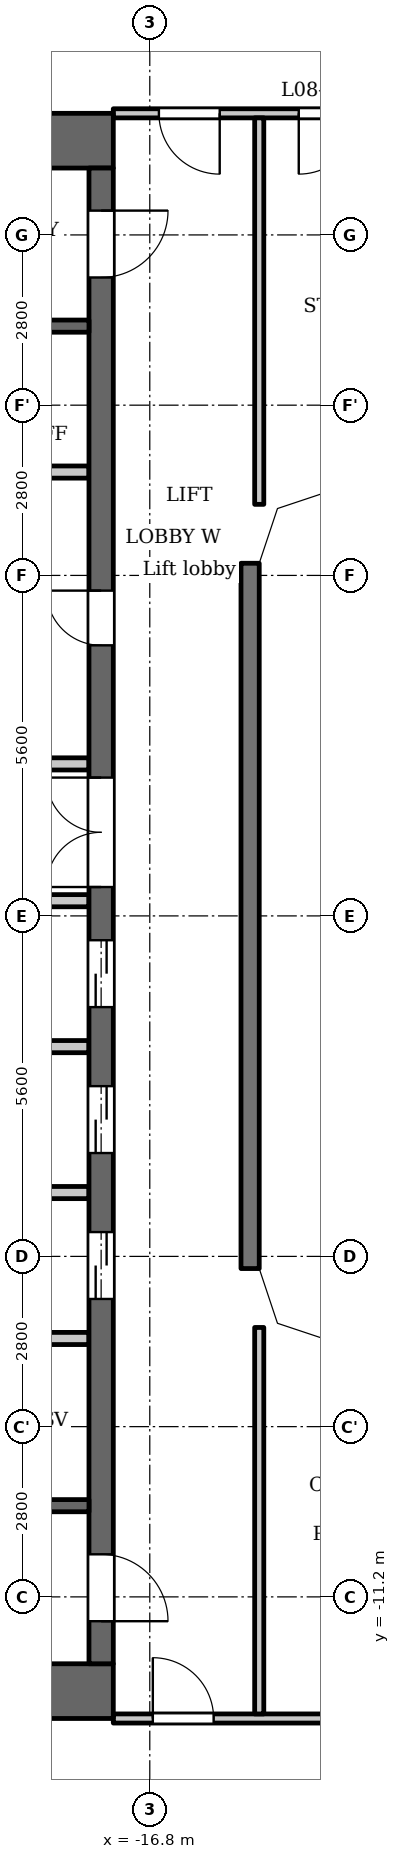
"""IFC4 building model, lengths in metres.
Left out: names, types, materials, properties, quantities, classifications, styles, units other than length and angle.
Written with IfcOpenShell. Run it as: python <this file> out.ifc"""

import sys

from ifc_helpers import new_model, si_unit, direction, frame, frame_2d, origin, place, context, subcontext, project, spatial, polyline, rectangle, outline, extrude, element, fill, save


model = new_model("IFC4")
c1 = context("Model", 3, precision=1e-05, world=origin(), true_north=direction((0.0, 1.0)))
c2 = subcontext(c1, "Body", "Model", "MODEL_VIEW")
j1 = project(units=[si_unit("LENGTHUNIT", "METRE"), si_unit("PLANEANGLEUNIT", "RADIAN")], contexts=[c1])
p1 = place(None, origin())
s1 = spatial("IfcSite", under=j1, at=p1, CompositionType="ELEMENT")
p2 = place(p1, origin())
s2 = spatial("IfcBuilding", under=s1, at=p2, CompositionType="ELEMENT")
p3 = place(p2, frame((0.0, 0.0, 37.5)))
s3 = spatial("IfcBuildingStorey", under=s2, at=p3, CompositionType="ELEMENT", Elevation=37.5)
p4 = place(p3, frame((-15.15, -5.8, 0.0), z_axis=(0.0, 0.0, 1.0), x_axis=(0.0, 1.0, 0.0)))
e1 = element("IfcWall", 1, at=p4, inside=s3, PredefinedType="SOLIDWALL", context=c2, shape_type="SweptSolid", body=[
    extrude(rectangle(XDim=11.6, YDim=0.3, at=frame_2d((5.8, 0.0))), origin(), (0.0, 0.0, 1.0), 3.2),
])
for number, where, z_axis, x_axis in (
    (2, (-17.4, 12.75, 0.0), (0.0, 0.0, 1.0), (-1.0, 0.0, 0.0)),
    (3, (-17.4, -12.75, 0.0), (0.0, 0.0, 1.0), (-1.0, 0.0, 0.0)),
):
    element("IfcWall", number, at=place(p3, frame(where, z_axis=z_axis, x_axis=x_axis)), inside=s3, PredefinedType="SHEAR", context=c2, shape_type="SweptSolid", body=[
        extrude(rectangle(XDim=10.4, YDim=0.9, at=frame_2d((5.2, 0.0))), origin(), (0.0, 0.0, 1.0), 3.2),
    ])
p5 = place(p3, frame((-17.6, -12.3, 0.0), z_axis=(0.0, 0.0, 1.0), x_axis=(0.0, 1.0, 0.0)))
e4 = element("IfcWall", 4, at=p5, inside=s3, PredefinedType="SHEAR", context=c2, shape_type="SweptSolid", body=[
    extrude(rectangle(XDim=24.6, YDim=0.4, at=frame_2d((12.3, 0.0))), origin(), (0.0, 0.0, 1.0), 3.2),
])
p6 = place(p5, frame((6.0, 0.0, 0.0)))
e5 = element("IfcOpeningElement", 5, at=p6, cuts=e4, PredefinedType="OPENING", context=c2, shape_type="SweptSolid", body=[
    extrude(rectangle(XDim=1.1, YDim=2.1, at=frame_2d((0.55, 1.05))), frame((0.0, 0.21, 0.0), z_axis=(0.0, -1.0, 0.0), x_axis=(1.0, 0.0, 0.0)), (0.0, 0.0, 1.0), 0.42),
])
p7 = place(p5, frame((8.4, 0.0, 0.0)))
e6 = element("IfcOpeningElement", 6, at=p7, cuts=e4, PredefinedType="OPENING", context=c2, shape_type="SweptSolid", body=[
    extrude(rectangle(XDim=1.1, YDim=2.1, at=frame_2d((0.55, 1.05))), frame((0.0, 0.21, 0.0), z_axis=(0.0, -1.0, 0.0), x_axis=(1.0, 0.0, 0.0)), (0.0, 0.0, 1.0), 0.42),
])
p8 = place(p5, frame((10.8, 0.0, 0.0)))
e7 = element("IfcOpeningElement", 7, at=p8, cuts=e4, PredefinedType="OPENING", context=c2, shape_type="SweptSolid", body=[
    extrude(rectangle(XDim=1.1, YDim=2.1, at=frame_2d((0.55, 1.05))), frame((0.0, 0.21, 0.0), z_axis=(0.0, -1.0, 0.0), x_axis=(1.0, 0.0, 0.0)), (0.0, 0.0, 1.0), 0.42),
])
p9 = place(p5, frame((16.75, 0.0, 0.0)))
e8 = element("IfcOpeningElement", 8, at=p9, cuts=e4, PredefinedType="OPENING", context=c2, shape_type="SweptSolid", body=[
    extrude(rectangle(XDim=0.9, YDim=2.1, at=frame_2d((0.45, 1.05))), frame((0.0, 0.21, 0.0), z_axis=(0.0, -1.0, 0.0), x_axis=(1.0, 0.0, 0.0)), (0.0, 0.0, 1.0), 0.42),
])
p10 = place(p5, frame((22.8, 0.0, 0.0)))
e9 = element("IfcOpeningElement", 9, at=p10, cuts=e4, PredefinedType="OPENING", context=c2, shape_type="SweptSolid", body=[
    extrude(rectangle(XDim=1.1, YDim=2.1, at=frame_2d((0.55, 1.05))), frame((0.0, 0.21, 0.0), z_axis=(0.0, -1.0, 0.0), x_axis=(1.0, 0.0, 0.0)), (0.0, 0.0, 1.0), 0.42),
])
p11 = place(p5, frame((0.7, 0.0, 0.0)))
e10 = element("IfcOpeningElement", 10, at=p11, cuts=e4, PredefinedType="OPENING", context=c2, shape_type="SweptSolid", body=[
    extrude(rectangle(XDim=1.1, YDim=2.1, at=frame_2d((0.55, 1.05))), frame((0.0, 0.21, 0.0), z_axis=(0.0, -1.0, 0.0), x_axis=(1.0, 0.0, 0.0)), (0.0, 0.0, 1.0), 0.42),
])
p12 = place(p5, frame((12.775, 0.0, 0.0)))
e11 = element("IfcOpeningElement", 11, at=p12, cuts=e4, PredefinedType="OPENING", context=c2, shape_type="SweptSolid", body=[
    extrude(rectangle(XDim=1.8, YDim=2.1, at=frame_2d((0.9, 1.05))), frame((0.0, 0.21, 0.0), z_axis=(0.0, -1.0, 0.0), x_axis=(1.0, 0.0, 0.0)), (0.0, 0.0, 1.0), 0.42),
])
p13 = place(p3, frame((-17.8, -9.7, 0.0), z_axis=(0.0, 0.0, 1.0), x_axis=(-1.0, 0.0, 0.0)))
e12 = element("IfcWall", 12, at=p13, inside=s3, PredefinedType="SHEAR", context=c2, shape_type="SweptSolid", body=[
    extrude(rectangle(XDim=8.3, YDim=0.2, at=frame_2d((4.15, 0.0))), origin(), (0.0, 0.0, 1.0), 3.2),
])
p14 = place(p13, frame((0.85, 0.0, 0.0)))
e13 = element("IfcOpeningElement", 13, at=p14, cuts=e12, PredefinedType="OPENING", context=c2, shape_type="SweptSolid", body=[
    extrude(rectangle(XDim=1.1, YDim=2.1, at=frame_2d((0.55, 1.05))), frame((0.0, 0.11, 0.0), z_axis=(0.0, -1.0, 0.0), x_axis=(1.0, 0.0, 0.0)), (0.0, 0.0, 1.0), 0.22),
])
p15 = place(p13, frame((3.75, 0.0, 0.0)))
e14 = element("IfcOpeningElement", 14, at=p15, cuts=e12, PredefinedType="OPENING", context=c2, shape_type="SweptSolid", body=[
    extrude(rectangle(XDim=1.1, YDim=2.1, at=frame_2d((0.55, 1.05))), frame((0.0, 0.11, 0.0), z_axis=(0.0, -1.0, 0.0), x_axis=(1.0, 0.0, 0.0)), (0.0, 0.0, 1.0), 0.22),
])
for number, where, z_axis, x_axis in (
    (15, (-17.8, -6.95, 0.0), (0.0, 0.0, 1.0), (-1.0, 0.0, 0.0)),
    (16, (-17.8, -4.55, 0.0), (0.0, 0.0, 1.0), (-1.0, 0.0, 0.0)),
    (17, (-17.8, -2.15, 0.0), (0.0, 0.0, 1.0), (-1.0, 0.0, 0.0)),
):
    element("IfcWall", number, at=place(p3, frame(where, z_axis=z_axis, x_axis=x_axis)), inside=s3, PredefinedType="PARTITIONING", context=c2, shape_type="SweptSolid", body=[
        extrude(rectangle(XDim=2.8, YDim=0.2, at=frame_2d((1.4, 0.0))), origin(), (0.0, 0.0, 1.0), 3.2),
    ])
for number, where, z_axis, x_axis in (
    (18, (-17.8, 0.25, 0.0), (0.0, 0.0, 1.0), (-1.0, 0.0, 0.0)),
    (19, (-17.8, 2.5, 0.0), (0.0, 0.0, 1.0), (-1.0, 0.0, 0.0)),
):
    element("IfcWall", number, at=place(p3, frame(where, z_axis=z_axis, x_axis=x_axis)), inside=s3, PredefinedType="PARTITIONING", context=c2, shape_type="SweptSolid", body=[
        extrude(rectangle(XDim=3.0, YDim=0.2, at=frame_2d((1.5, 0.0))), origin(), (0.0, 0.0, 1.0), 3.2),
    ])
p16 = place(p3, frame((-17.8, 7.3, 0.0), z_axis=(0.0, 0.0, 1.0), x_axis=(-1.0, 0.0, 0.0)))
e20 = element("IfcWall", 20, at=p16, inside=s3, PredefinedType="PARTITIONING", context=c2, shape_type="SweptSolid", body=[
    extrude(rectangle(XDim=2.8, YDim=0.2, at=frame_2d((1.4, 0.0))), origin(), (0.0, 0.0, 1.0), 3.2),
])
p17 = place(p3, frame((-17.8, 9.7, 0.0), z_axis=(0.0, 0.0, 1.0), x_axis=(-1.0, 0.0, 0.0)))
e21 = element("IfcWall", 21, at=p17, inside=s3, PredefinedType="SHEAR", context=c2, shape_type="SweptSolid", body=[
    extrude(rectangle(XDim=8.3, YDim=0.2, at=frame_2d((4.15, 0.0))), origin(), (0.0, 0.0, 1.0), 3.2),
])
p18 = place(p17, frame((0.85, 0.0, 0.0)))
e22 = element("IfcOpeningElement", 22, at=p18, cuts=e21, PredefinedType="OPENING", context=c2, shape_type="SweptSolid", body=[
    extrude(rectangle(XDim=1.1, YDim=2.1, at=frame_2d((0.55, 1.05))), frame((0.0, 0.11, 0.0), z_axis=(0.0, -1.0, 0.0), x_axis=(1.0, 0.0, 0.0)), (0.0, 0.0, 1.0), 0.22),
])
p19 = place(p17, frame((3.75, 0.0, 0.0)))
e23 = element("IfcOpeningElement", 23, at=p19, cuts=e21, PredefinedType="OPENING", context=c2, shape_type="SweptSolid", body=[
    extrude(rectangle(XDim=1.1, YDim=2.1, at=frame_2d((0.55, 1.05))), frame((0.0, 0.11, 0.0), z_axis=(0.0, -1.0, 0.0), x_axis=(1.0, 0.0, 0.0)), (0.0, 0.0, 1.0), 0.22),
])
p20 = place(p3, frame((-17.4, -13.2, 0.0), z_axis=(0.0, 0.0, 1.0), x_axis=(1.0, 0.0, 0.0)))
e24 = element("IfcWall", 24, at=p20, inside=s3, PredefinedType="PARTITIONING", context=c2, shape_type="SweptSolid", body=[
    extrude(rectangle(XDim=34.8, YDim=0.15, at=frame_2d((17.4, 0.0))), origin(), (0.0, 0.0, 1.0), 3.2),
])
p21 = place(p20, frame((0.65, 0.0, 0.0)))
e25 = element("IfcOpeningElement", 25, at=p21, cuts=e24, PredefinedType="OPENING", context=c2, shape_type="SweptSolid", body=[
    extrude(rectangle(XDim=1.0, YDim=2.1, at=frame_2d((0.5, 1.05))), frame((0.0, 0.085, 0.0), z_axis=(0.0, -1.0, 0.0), x_axis=(1.0, 0.0, 0.0)), (0.0, 0.0, 1.0), 0.17),
])
p22 = place(p20, frame((33.05, 0.0, 0.0)))
e26 = element("IfcOpeningElement", 26, at=p22, cuts=e24, PredefinedType="OPENING", context=c2, shape_type="SweptSolid", body=[
    extrude(rectangle(XDim=1.0, YDim=2.1, at=frame_2d((0.5, 1.05))), frame((0.0, 0.085, 0.0), z_axis=(0.0, -1.0, 0.0), x_axis=(1.0, 0.0, 0.0)), (0.0, 0.0, 1.0), 0.17),
])
p23 = place(p20, frame((4.55, 0.0, 0.0)))
e27 = element("IfcOpeningElement", 27, at=p23, cuts=e24, PredefinedType="OPENING", context=c2, shape_type="SweptSolid", body=[
    extrude(rectangle(XDim=1.0, YDim=2.1, at=frame_2d((0.5, 1.05))), frame((0.0, 0.085, 0.0), z_axis=(0.0, -1.0, 0.0), x_axis=(1.0, 0.0, 0.0)), (0.0, 0.0, 1.0), 0.17),
])
p24 = place(p20, frame((6.9, 0.0, 0.0)))
e28 = element("IfcOpeningElement", 28, at=p24, cuts=e24, PredefinedType="OPENING", context=c2, shape_type="SweptSolid", body=[
    extrude(rectangle(XDim=1.0, YDim=2.1, at=frame_2d((0.5, 1.05))), frame((0.0, 0.085, 0.0), z_axis=(0.0, -1.0, 0.0), x_axis=(1.0, 0.0, 0.0)), (0.0, 0.0, 1.0), 0.17),
])
p25 = place(p20, frame((15.75, 0.0, 0.0)))
e29 = element("IfcOpeningElement", 29, at=p25, cuts=e24, PredefinedType="OPENING", context=c2, shape_type="SweptSolid", body=[
    extrude(rectangle(XDim=1.0, YDim=2.1, at=frame_2d((0.5, 1.05))), frame((0.0, 0.085, 0.0), z_axis=(0.0, -1.0, 0.0), x_axis=(1.0, 0.0, 0.0)), (0.0, 0.0, 1.0), 0.17),
])
p26 = place(p20, frame((18.1, 0.0, 0.0)))
e30 = element("IfcOpeningElement", 30, at=p26, cuts=e24, PredefinedType="OPENING", context=c2, shape_type="SweptSolid", body=[
    extrude(rectangle(XDim=1.0, YDim=2.1, at=frame_2d((0.5, 1.05))), frame((0.0, 0.085, 0.0), z_axis=(0.0, -1.0, 0.0), x_axis=(1.0, 0.0, 0.0)), (0.0, 0.0, 1.0), 0.17),
])
p27 = place(p20, frame((26.95, 0.0, 0.0)))
e31 = element("IfcOpeningElement", 31, at=p27, cuts=e24, PredefinedType="OPENING", context=c2, shape_type="SweptSolid", body=[
    extrude(rectangle(XDim=1.0, YDim=2.1, at=frame_2d((0.5, 1.05))), frame((0.0, 0.085, 0.0), z_axis=(0.0, -1.0, 0.0), x_axis=(1.0, 0.0, 0.0)), (0.0, 0.0, 1.0), 0.17),
])
p28 = place(p20, frame((29.25, 0.0, 0.0)))
e32 = element("IfcOpeningElement", 32, at=p28, cuts=e24, PredefinedType="OPENING", context=c2, shape_type="SweptSolid", body=[
    extrude(rectangle(XDim=1.0, YDim=2.1, at=frame_2d((0.5, 1.05))), frame((0.0, 0.085, 0.0), z_axis=(0.0, -1.0, 0.0), x_axis=(1.0, 0.0, 0.0)), (0.0, 0.0, 1.0), 0.17),
])
p29 = place(p3, frame((-17.4, 13.2, 0.0), z_axis=(0.0, 0.0, 1.0), x_axis=(1.0, 0.0, 0.0)))
e33 = element("IfcWall", 33, at=p29, inside=s3, PredefinedType="PARTITIONING", context=c2, shape_type="SweptSolid", body=[
    extrude(rectangle(XDim=34.8, YDim=0.15, at=frame_2d((17.4, 0.0))), origin(), (0.0, 0.0, 1.0), 3.2),
])
p30 = place(p29, frame((0.75, 0.0, 0.0)))
e34 = element("IfcOpeningElement", 34, at=p30, cuts=e33, PredefinedType="OPENING", context=c2, shape_type="SweptSolid", body=[
    extrude(rectangle(XDim=1.0, YDim=2.1, at=frame_2d((0.5, 1.05))), frame((0.0, 0.085, 0.0), z_axis=(0.0, -1.0, 0.0), x_axis=(1.0, 0.0, 0.0)), (0.0, 0.0, 1.0), 0.17),
])
p31 = place(p29, frame((33.15, 0.0, 0.0)))
e35 = element("IfcOpeningElement", 35, at=p31, cuts=e33, PredefinedType="OPENING", context=c2, shape_type="SweptSolid", body=[
    extrude(rectangle(XDim=1.0, YDim=2.1, at=frame_2d((0.5, 1.05))), frame((0.0, 0.085, 0.0), z_axis=(0.0, -1.0, 0.0), x_axis=(1.0, 0.0, 0.0)), (0.0, 0.0, 1.0), 0.17),
])
p32 = place(p29, frame((3.05, 0.0, 0.0)))
e36 = element("IfcOpeningElement", 36, at=p32, cuts=e33, PredefinedType="OPENING", context=c2, shape_type="SweptSolid", body=[
    extrude(rectangle(XDim=1.0, YDim=2.1, at=frame_2d((0.5, 1.05))), frame((0.0, 0.085, 0.0), z_axis=(0.0, -1.0, 0.0), x_axis=(1.0, 0.0, 0.0)), (0.0, 0.0, 1.0), 0.17),
])
p33 = place(p29, frame((10.1, 0.0, 0.0)))
e37 = element("IfcOpeningElement", 37, at=p33, cuts=e33, PredefinedType="OPENING", context=c2, shape_type="SweptSolid", body=[
    extrude(rectangle(XDim=1.0, YDim=2.1, at=frame_2d((0.5, 1.05))), frame((0.0, 0.085, 0.0), z_axis=(0.0, -1.0, 0.0), x_axis=(1.0, 0.0, 0.0)), (0.0, 0.0, 1.0), 0.17),
])
p34 = place(p29, frame((12.45, 0.0, 0.0)))
e38 = element("IfcOpeningElement", 38, at=p34, cuts=e33, PredefinedType="OPENING", context=c2, shape_type="SweptSolid", body=[
    extrude(rectangle(XDim=1.0, YDim=2.1, at=frame_2d((0.5, 1.05))), frame((0.0, 0.085, 0.0), z_axis=(0.0, -1.0, 0.0), x_axis=(1.0, 0.0, 0.0)), (0.0, 0.0, 1.0), 0.17),
])
p35 = place(p29, frame((21.3, 0.0, 0.0)))
e39 = element("IfcOpeningElement", 39, at=p35, cuts=e33, PredefinedType="OPENING", context=c2, shape_type="SweptSolid", body=[
    extrude(rectangle(XDim=1.0, YDim=2.1, at=frame_2d((0.5, 1.05))), frame((0.0, 0.085, 0.0), z_axis=(0.0, -1.0, 0.0), x_axis=(1.0, 0.0, 0.0)), (0.0, 0.0, 1.0), 0.17),
])
p36 = place(p29, frame((23.65, 0.0, 0.0)))
e40 = element("IfcOpeningElement", 40, at=p36, cuts=e33, PredefinedType="OPENING", context=c2, shape_type="SweptSolid", body=[
    extrude(rectangle(XDim=1.0, YDim=2.1, at=frame_2d((0.5, 1.05))), frame((0.0, 0.085, 0.0), z_axis=(0.0, -1.0, 0.0), x_axis=(1.0, 0.0, 0.0)), (0.0, 0.0, 1.0), 0.17),
])
p37 = place(p29, frame((30.75, 0.0, 0.0)))
e41 = element("IfcOpeningElement", 41, at=p37, cuts=e33, PredefinedType="OPENING", context=c2, shape_type="SweptSolid", body=[
    extrude(rectangle(XDim=1.0, YDim=2.1, at=frame_2d((0.5, 1.05))), frame((0.0, 0.085, 0.0), z_axis=(0.0, -1.0, 0.0), x_axis=(1.0, 0.0, 0.0)), (0.0, 0.0, 1.0), 0.17),
])
for number, where, z_axis, x_axis in (
    (42, (-15.0, -13.125, 0.0), (0.0, 0.0, 1.0), (0.0, 1.0, 0.0)),
    (43, (-15.0, 6.769, 0.0), (0.0, 0.0, 1.0), (0.0, 1.0, 0.0)),
):
    element("IfcWall", number, at=place(p3, frame(where, z_axis=z_axis, x_axis=x_axis)), inside=s3, PredefinedType="PARTITIONING", context=c2, shape_type="SweptSolid", body=[
        extrude(rectangle(XDim=6.356, YDim=0.15, at=frame_2d((3.178, 0.0))), origin(), (0.0, 0.0, 1.0), 3.2),
    ])
p38 = place(p3, origin())
e44 = element("IfcWall", 44, at=p38, inside=s3, PredefinedType="SOLIDWALL", context=c2, shape_type="SweptSolid", body=[
    extrude(outline(polyline([(-13.849, 7.3), (-14.937, 6.937), (-15.3, 5.849), (-15.3, 5.8), (-15.0, 5.8), (-14.7, 6.7), (-13.8, 7.0), (-13.8, 7.3), (-13.849, 7.3)])), origin(), (0.0, 0.0, 1.0), 3.2),
])
e45 = element("IfcWall", 45, at=p38, inside=s3, PredefinedType="SOLIDWALL", context=c2, shape_type="SweptSolid", body=[
    extrude(outline(polyline([(-14.937, -6.937), (-13.849, -7.3), (-13.8, -7.3), (-13.8, -7.0), (-14.7, -6.7), (-15.0, -5.8), (-15.3, -5.8), (-15.3, -5.849), (-14.937, -6.937)])), origin(), (0.0, 0.0, 1.0), 3.2),
])
p39 = place(p6, origin())
e46 = element("IfcDoor", 46, at=p39, inside=s3, OperationType="DOUBLE_DOOR_SLIDING", PredefinedType="DOOR", context=c2, shape_type="SweptSolid", body=[
    extrude(rectangle(XDim=1.1, YDim=2.1, at=frame_2d((0.55, 1.05))), frame((0.0, 0.025, 0.0), z_axis=(0.0, -1.0, 0.0), x_axis=(1.0, 0.0, 0.0)), (0.0, 0.0, 1.0), 0.05),
])
fill(e5, e46)
p40 = place(p7, origin())
e47 = element("IfcDoor", 47, at=p40, inside=s3, OperationType="DOUBLE_DOOR_SLIDING", PredefinedType="DOOR", context=c2, shape_type="SweptSolid", body=[
    extrude(rectangle(XDim=1.1, YDim=2.1, at=frame_2d((0.55, 1.05))), frame((0.0, 0.025, 0.0), z_axis=(0.0, -1.0, 0.0), x_axis=(1.0, 0.0, 0.0)), (0.0, 0.0, 1.0), 0.05),
])
fill(e6, e47)
p41 = place(p8, origin())
e48 = element("IfcDoor", 48, at=p41, inside=s3, OperationType="DOUBLE_DOOR_SLIDING", PredefinedType="DOOR", context=c2, shape_type="SweptSolid", body=[
    extrude(rectangle(XDim=1.1, YDim=2.1, at=frame_2d((0.55, 1.05))), frame((0.0, 0.025, 0.0), z_axis=(0.0, -1.0, 0.0), x_axis=(1.0, 0.0, 0.0)), (0.0, 0.0, 1.0), 0.05),
])
fill(e7, e48)
p42 = place(p9, origin())
e49 = element("IfcDoor", 49, at=p42, inside=s3, OperationType="SINGLE_SWING_LEFT", PredefinedType="DOOR", context=c2, shape_type="SweptSolid", body=[
    extrude(rectangle(XDim=0.9, YDim=2.1, at=frame_2d((0.45, 1.05))), frame((0.0, 0.025, 0.0), z_axis=(0.0, -1.0, 0.0), x_axis=(1.0, 0.0, 0.0)), (0.0, 0.0, 1.0), 0.05),
])
fill(e8, e49)
p43 = place(p10, origin())
e50 = element("IfcDoor", 50, at=p43, inside=s3, OperationType="SINGLE_SWING_RIGHT", PredefinedType="DOOR", context=c2, shape_type="SweptSolid", body=[
    extrude(rectangle(XDim=1.1, YDim=2.1, at=frame_2d((0.55, 1.05))), frame((0.0, 0.025, 0.0), z_axis=(0.0, -1.0, 0.0), x_axis=(1.0, 0.0, 0.0)), (0.0, 0.0, 1.0), 0.05),
])
fill(e9, e50)
p44 = place(p11, origin())
e51 = element("IfcDoor", 51, at=p44, inside=s3, OperationType="SINGLE_SWING_LEFT", PredefinedType="DOOR", context=c2, shape_type="SweptSolid", body=[
    extrude(rectangle(XDim=1.1, YDim=2.1, at=frame_2d((0.55, 1.05))), frame((0.0, 0.025, 0.0), z_axis=(0.0, -1.0, 0.0), x_axis=(1.0, 0.0, 0.0)), (0.0, 0.0, 1.0), 0.05),
])
fill(e10, e51)
p45 = place(p12, origin())
e52 = element("IfcDoor", 52, at=p45, inside=s3, OperationType="DOUBLE_DOOR_SINGLE_SWING", PredefinedType="DOOR", context=c2, shape_type="SweptSolid", body=[
    extrude(rectangle(XDim=1.8, YDim=2.1, at=frame_2d((0.9, 1.05))), frame((0.0, 0.025, 0.0), z_axis=(0.0, -1.0, 0.0), x_axis=(1.0, 0.0, 0.0)), (0.0, 0.0, 1.0), 0.05),
])
fill(e11, e52)
p46 = place(p30, origin())
e53 = element("IfcDoor", 53, at=p46, inside=s3, OperationType="SINGLE_SWING_RIGHT", PredefinedType="DOOR", context=c2, shape_type="SweptSolid", body=[
    extrude(rectangle(XDim=1.0, YDim=2.1, at=frame_2d((0.5, 1.05))), frame((0.0, 0.025, 0.0), z_axis=(0.0, -1.0, 0.0), x_axis=(1.0, 0.0, 0.0)), (0.0, 0.0, 1.0), 0.05),
])
fill(e34, e53)
p47 = place(p21, origin())
e54 = element("IfcDoor", 54, at=p47, inside=s3, OperationType="SINGLE_SWING_RIGHT", PredefinedType="DOOR", context=c2, shape_type="SweptSolid", body=[
    extrude(rectangle(XDim=1.0, YDim=2.1, at=frame_2d((0.5, 1.05))), frame((0.0, 0.025, 0.0), z_axis=(0.0, -1.0, 0.0), x_axis=(1.0, 0.0, 0.0)), (0.0, 0.0, 1.0), 0.05),
])
fill(e25, e54)
p48 = place(p32, origin())
e55 = element("IfcDoor", 55, at=p48, inside=s3, OperationType="SINGLE_SWING_LEFT", PredefinedType="DOOR", context=c2, shape_type="SweptSolid", body=[
    extrude(rectangle(XDim=1.0, YDim=2.1, at=frame_2d((0.5, 1.05))), frame((0.0, 0.025, 0.0), z_axis=(0.0, -1.0, 0.0), x_axis=(1.0, 0.0, 0.0)), (0.0, 0.0, 1.0), 0.05),
])
fill(e36, e55)
save(model, sys.argv[1])
